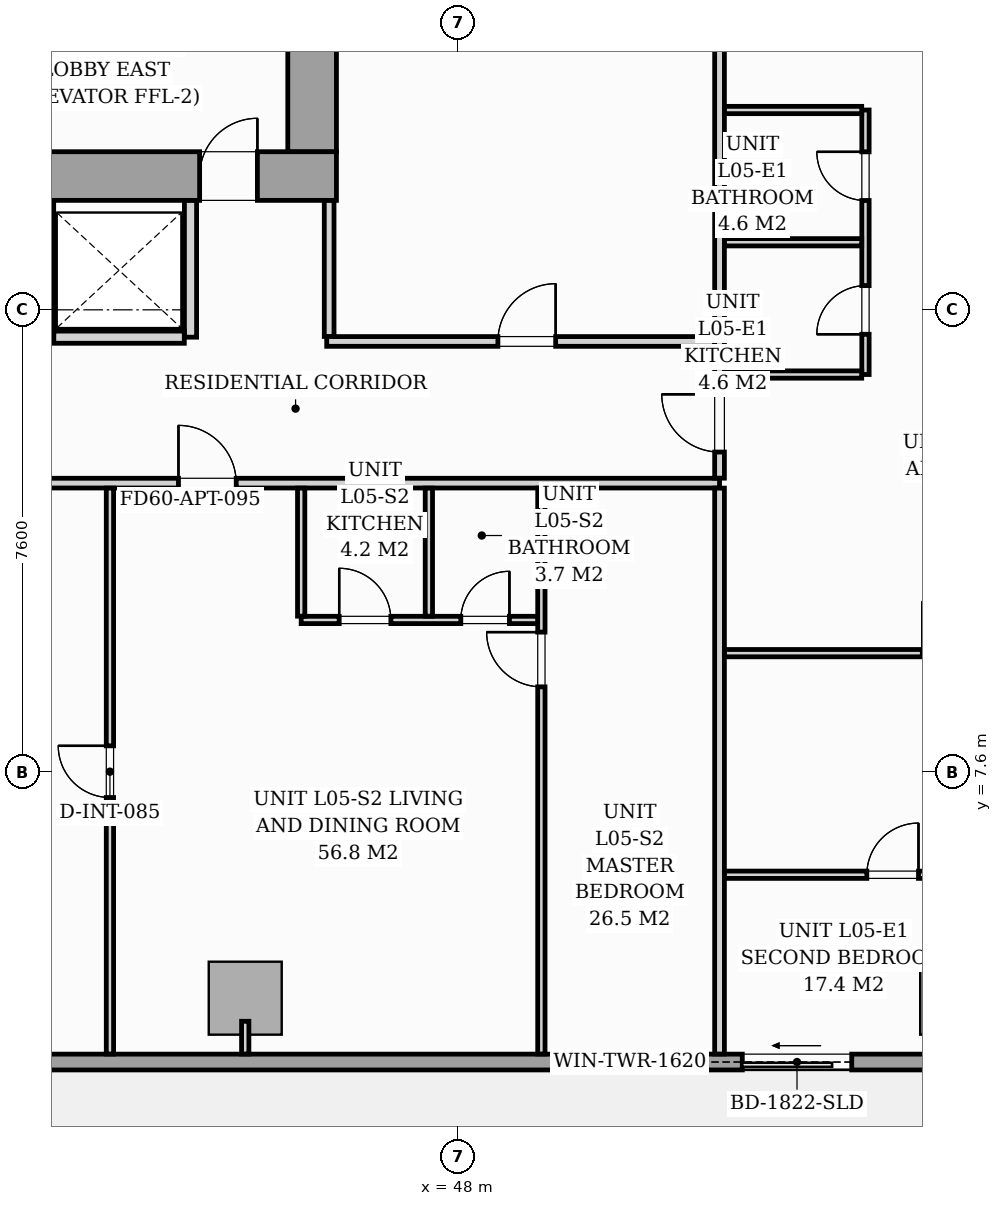
"""IFC4 building model, lengths in metres.
Left out: names, types, materials, properties, quantities, classifications, styles, units other than length and angle.
Written with IfcOpenShell. Run it as: python <this file> out.ifc"""

import sys

from ifc_helpers import new_model, si_unit, direction, frame, frame_2d, origin, origin_2d, place, context, subcontext, project, spatial, rectangle, i_section, extrude, source, transform, mapped, element, fill, save


model = new_model("IFC4")
c1 = context("Model", 3, precision=1e-05, world=origin(), true_north=direction((0.0, 1.0)))
c2 = subcontext(c1, "Body", "Model", "MODEL_VIEW")
j1 = project(units=[si_unit("LENGTHUNIT", "METRE"), si_unit("PLANEANGLEUNIT", "RADIAN")], contexts=[c1])
p1 = place(None, origin())
s1 = spatial("IfcSite", under=j1, at=p1, CompositionType="ELEMENT")
p2 = place(p1, origin())
s2 = spatial("IfcBuilding", under=s1, at=p2, CompositionType="ELEMENT")
p3 = place(p2, frame((0.0, 0.0, 23.0)))
s3 = spatial("IfcBuildingStorey", under=s2, at=p3, CompositionType="ELEMENT", Elevation=23.0)
m1 = source(origin(), c2, "Body", "SweptSolid", [
    extrude(i_section(OverallWidth=0.437, OverallDepth=0.514, WebThickness=0.061, FlangeThickness=0.097, FilletRadius=0.018, at=origin_2d()), origin(), (0.0, 0.0, 1.0), 3.196),
])
p4 = place(p3, frame((45.6, 17.4, 0.002), z_axis=(0.0, 0.0, 1.0), x_axis=(1.0, 0.0, 0.0)))
e1 = element("IfcColumn", 1, at=p4, inside=s3, PredefinedType="PILASTER", context=c2, shape_type="MappedRepresentation", body=[
    mapped(m1, transform((0.0, 0.0, 0.0), scale=1.0)),
])
m2 = source(origin(), c2, "Body", "SweptSolid", [
    extrude(rectangle(XDim=1.2, YDim=1.2, at=origin_2d()), origin(), (0.0, 0.0, 1.0), 3.194),
])
for number, where, z_axis, x_axis in (
    (2, (44.5, 3.88, 0.004), (0.0, 0.0, 1.0), (1.0, 0.0, 0.0)),
    (3, (56.2, 3.88, 0.004), (0.0, 0.0, 1.0), (1.0, 0.0, 0.0)),
):
    element("IfcColumn", number, at=place(p3, frame(where, z_axis=z_axis, x_axis=x_axis)), inside=s3, PredefinedType="COLUMN", context=c2, shape_type="MappedRepresentation", body=[
        mapped(m2, transform((0.0, 0.0, 0.0), scale=1.0)),
    ])
p5 = place(p3, frame((57.3, 2.83, 0.0), z_axis=(0.0, 0.0, 1.0), x_axis=(-1.0, 0.0, 0.0)))
e4 = element("IfcWall", 4, at=p5, inside=s3, PredefinedType="STANDARD", context=c2, shape_type="SweptSolid", body=[
    extrude(rectangle(XDim=17.15, YDim=0.26, at=frame_2d((8.575, 0.0))), origin(), (0.0, 0.0, 1.0), 2.94),
])
p6 = place(p5, frame((2.826, 0.0, 0.0)))
e5 = element("IfcOpeningElement", 5, at=p6, cuts=e4, PredefinedType="OPENING", context=c2, shape_type="SweptSolid", body=[
    extrude(rectangle(XDim=1.8, YDim=2.06, at=frame_2d((0.9, 1.03))), frame((0.0, 0.14, 0.0), z_axis=(0.0, -1.0, 0.0), x_axis=(1.0, 0.0, 0.0)), (0.0, 0.0, 1.0), 0.28),
])
p7 = place(p5, frame((5.675, 0.0, 0.75)))
e6 = element("IfcOpeningElement", 6, at=p7, cuts=e4, PredefinedType="OPENING", context=c2, shape_type="SweptSolid", body=[
    extrude(rectangle(XDim=1.6, YDim=1.5, at=frame_2d((0.8, 0.75))), frame((0.0, 0.14, 0.0), z_axis=(0.0, -1.0, 0.0), x_axis=(1.0, 0.0, 0.0)), (0.0, 0.0, 1.0), 0.28),
])
p8 = place(p3, frame((26.0, 17.4, 0.0), z_axis=(0.0, 0.0, 1.0), x_axis=(1.0, 0.0, 0.0)))
e7 = element("IfcWall", 7, at=p8, inside=s3, PredefinedType="SHEAR", context=c2, shape_type="SweptSolid", body=[
    extrude(rectangle(XDim=20.0, YDim=0.8, at=frame_2d((10.0, 0.0))), origin(), (0.0, 0.0, 1.0), 3.2),
])
p9 = place(p8, frame((1.15, 0.0, 0.0)))
e8 = element("IfcOpeningElement", 8, at=p9, cuts=e7, PredefinedType="OPENING", context=c2, shape_type="SweptSolid", body=[
    extrude(rectangle(XDim=0.95, YDim=2.06, at=frame_2d((0.475, 1.03))), frame((0.0, 0.41, 0.0), z_axis=(0.0, -1.0, 0.0), x_axis=(1.0, 0.0, 0.0)), (0.0, 0.0, 1.0), 0.82),
])
p10 = place(p8, frame((9.58, 0.0, 0.0)))
e9 = element("IfcOpeningElement", 9, at=p10, cuts=e7, PredefinedType="OPENING", context=c2, shape_type="SweptSolid", body=[
    extrude(rectangle(XDim=0.85, YDim=2.0, at=frame_2d((0.425, 1.0))), frame((0.0, 0.41, 0.0), z_axis=(0.0, -1.0, 0.0), x_axis=(1.0, 0.0, 0.0)), (0.0, 0.0, 1.0), 0.82),
])
p11 = place(p8, frame((17.75, 0.0, 0.0)))
e10 = element("IfcOpeningElement", 10, at=p11, cuts=e7, PredefinedType="OPENING", context=c2, shape_type="SweptSolid", body=[
    extrude(rectangle(XDim=0.95, YDim=2.06, at=frame_2d((0.475, 1.03))), frame((0.0, 0.41, 0.0), z_axis=(0.0, -1.0, 0.0), x_axis=(1.0, 0.0, 0.0)), (0.0, 0.0, 1.0), 0.82),
])
p12 = place(p3, frame((45.6, 17.802, 0.0), z_axis=(0.0, 0.0, 1.0), x_axis=(0.0, 1.0, 0.0)))
e11 = element("IfcWall", 11, at=p12, inside=s3, PredefinedType="SHEAR", context=c2, shape_type="SweptSolid", body=[
    extrude(rectangle(XDim=5.796, YDim=0.8, at=frame_2d((2.898, 0.0))), origin(), (0.0, 0.0, 1.0), 3.2),
])
for number, where, z_axis, x_axis in (
    (12, (41.25, 14.75, 0.0), (0.0, 0.0, 1.0), (0.0, 1.0, 0.0)),
    (13, (43.6, 14.75, 0.0), (0.0, 0.0, 1.0), (0.0, 1.0, 0.0)),
):
    element("IfcWall", number, at=place(p3, frame(where, z_axis=z_axis, x_axis=x_axis)), inside=s3, PredefinedType="PARTITIONING", context=c2, shape_type="SweptSolid", body=[
        extrude(rectangle(XDim=2.248, YDim=0.2, at=frame_2d((1.124, 0.0))), origin(), (0.0, 0.0, 1.0), 2.94),
    ])
p13 = place(p3, frame((41.352, 14.75, 0.0), z_axis=(0.0, 0.0, 1.0), x_axis=(1.0, 0.0, 0.0)))
e14 = element("IfcWall", 14, at=p13, inside=s3, PredefinedType="PARTITIONING", context=c2, shape_type="SweptSolid", body=[
    extrude(rectangle(XDim=2.146, YDim=0.2, at=frame_2d((1.073, 0.0))), origin(), (0.0, 0.0, 1.0), 2.94),
])
p14 = place(p3, frame((15.2, 12.35, 0.0), z_axis=(0.0, 0.0, 1.0), x_axis=(1.0, 0.0, 0.0)))
e15 = element("IfcWall", 15, at=p14, inside=s3, PredefinedType="PARTITIONING", context=c2, shape_type="SweptSolid", body=[
    extrude(rectangle(XDim=37.1, YDim=0.16, at=frame_2d((18.55, 0.0))), origin(), (0.0, 0.0, 1.0), 2.94),
])
p15 = place(p14, frame((2.964, 0.0, 0.0)))
e16 = element("IfcOpeningElement", 16, at=p15, cuts=e15, PredefinedType="OPENING", context=c2, shape_type="SweptSolid", body=[
    extrude(rectangle(XDim=0.95, YDim=2.06, at=frame_2d((0.475, 1.03))), frame((0.0, 0.09, 0.0), z_axis=(0.0, -1.0, 0.0), x_axis=(1.0, 0.0, 0.0)), (0.0, 0.0, 1.0), 0.18),
])
p16 = place(p14, frame((28.202, 0.0, 0.0)))
e17 = element("IfcOpeningElement", 17, at=p16, cuts=e15, PredefinedType="OPENING", context=c2, shape_type="SweptSolid", body=[
    extrude(rectangle(XDim=0.95, YDim=2.06, at=frame_2d((0.475, 1.03))), frame((0.0, 0.09, 0.0), z_axis=(0.0, -1.0, 0.0), x_axis=(1.0, 0.0, 0.0)), (0.0, 0.0, 1.0), 0.18),
])
p17 = place(p3, frame((52.3, 2.962, 0.0), z_axis=(0.0, 0.0, 1.0), x_axis=(0.0, 1.0, 0.0)))
e18 = element("IfcWall", 18, at=p17, inside=s3, PredefinedType="PARTITIONING", context=c2, shape_type="SweptSolid", body=[
    extrude(rectangle(XDim=9.306, YDim=0.16, at=frame_2d((4.653, 0.0))), origin(), (0.0, 0.0, 1.0), 2.94),
])
p18 = place(p3, frame((52.3, 12.432, 0.0), z_axis=(0.0, 0.0, 1.0), x_axis=(0.0, 1.0, 0.0)))
e19 = element("IfcWall", 19, at=p18, inside=s3, PredefinedType="PARTITIONING", context=c2, shape_type="SweptSolid", body=[
    extrude(rectangle(XDim=15.006, YDim=0.16, at=frame_2d((7.503, 0.0))), origin(), (0.0, 0.0, 1.0), 2.94),
])
p19 = place(p18, frame((0.429, 0.0, 0.0)))
e20 = element("IfcOpeningElement", 20, at=p19, cuts=e19, PredefinedType="OPENING", context=c2, shape_type="SweptSolid", body=[
    extrude(rectangle(XDim=0.95, YDim=2.06, at=frame_2d((0.475, 1.03))), frame((0.0, 0.09, 0.0), z_axis=(0.0, -1.0, 0.0), x_axis=(1.0, 0.0, 0.0)), (0.0, 0.0, 1.0), 0.18),
])
p20 = place(p3, frame((49.37, 2.962, 0.0), z_axis=(0.0, 0.0, 1.0), x_axis=(0.0, 1.0, 0.0)))
e21 = element("IfcWall", 21, at=p20, inside=s3, PredefinedType="PARTITIONING", context=c2, shape_type="SweptSolid", body=[
    extrude(rectangle(XDim=9.306, YDim=0.12, at=frame_2d((4.653, 0.0))), origin(), (0.0, 0.0, 1.0), 2.94),
])
p21 = place(p20, frame((6.038, 0.0, 0.0)))
e22 = element("IfcOpeningElement", 22, at=p21, cuts=e21, PredefinedType="OPENING", context=c2, shape_type="SweptSolid", body=[
    extrude(rectangle(XDim=0.9, YDim=2.05, at=frame_2d((0.45, 1.025))), frame((0.0, 0.07, 0.0), z_axis=(0.0, -1.0, 0.0), x_axis=(1.0, 0.0, 0.0)), (0.0, 0.0, 1.0), 0.14),
])
p22 = place(p3, frame((45.42, 10.1, 0.0), z_axis=(0.0, 0.0, 1.0), x_axis=(1.0, 0.0, 0.0)))
e23 = element("IfcWall", 23, at=p22, inside=s3, PredefinedType="PARTITIONING", context=c2, shape_type="SweptSolid", body=[
    extrude(rectangle(XDim=3.888, YDim=0.12, at=frame_2d((1.944, 0.0))), origin(), (0.0, 0.0, 1.0), 2.94),
])
p23 = place(p22, frame((0.625, 0.0, 0.0)))
e24 = element("IfcOpeningElement", 24, at=p23, cuts=e23, PredefinedType="OPENING", context=c2, shape_type="SweptSolid", body=[
    extrude(rectangle(XDim=0.85, YDim=2.05, at=frame_2d((0.425, 1.025))), frame((0.0, 0.07, 0.0), z_axis=(0.0, -1.0, 0.0), x_axis=(1.0, 0.0, 0.0)), (0.0, 0.0, 1.0), 0.14),
])
p24 = place(p22, frame((2.625, 0.0, 0.0)))
e25 = element("IfcOpeningElement", 25, at=p24, cuts=e23, PredefinedType="OPENING", context=c2, shape_type="SweptSolid", body=[
    extrude(rectangle(XDim=0.8, YDim=2.02, at=frame_2d((0.4, 1.01))), frame((0.0, 0.07, 0.0), z_axis=(0.0, -1.0, 0.0), x_axis=(1.0, 0.0, 0.0)), (0.0, 0.0, 1.0), 0.14),
])
for number, where, z_axis, x_axis in (
    (26, (47.52, 10.162, 0.0), (0.0, 0.0, 1.0), (0.0, 1.0, 0.0)),
    (27, (45.42, 10.162, 0.0), (0.0, 0.0, 1.0), (0.0, 1.0, 0.0)),
):
    element("IfcWall", number, at=place(p3, frame(where, z_axis=z_axis, x_axis=x_axis)), inside=s3, PredefinedType="PARTITIONING", context=c2, shape_type="SweptSolid", body=[
        extrude(rectangle(XDim=2.106, YDim=0.12, at=frame_2d((1.053, 0.0))), origin(), (0.0, 0.0, 1.0), 2.94),
    ])
p25 = place(p3, frame((42.275, 2.962, 0.0), z_axis=(0.0, 0.0, 1.0), x_axis=(0.0, 1.0, 0.0)))
e28 = element("IfcWall", 28, at=p25, inside=s3, PredefinedType="PARTITIONING", context=c2, shape_type="SweptSolid", body=[
    extrude(rectangle(XDim=9.306, YDim=0.12, at=frame_2d((4.653, 0.0))), origin(), (0.0, 0.0, 1.0), 2.94),
])
p26 = place(p25, frame((4.218, 0.0, 0.0)))
e29 = element("IfcOpeningElement", 29, at=p26, cuts=e28, PredefinedType="OPENING", context=c2, shape_type="SweptSolid", body=[
    extrude(rectangle(XDim=0.85, YDim=2.05, at=frame_2d((0.425, 1.025))), frame((0.0, 0.07, 0.0), z_axis=(0.0, -1.0, 0.0), x_axis=(1.0, 0.0, 0.0)), (0.0, 0.0, 1.0), 0.14),
])
p27 = place(p3, frame((54.7, 14.136, 0.0), z_axis=(0.0, 0.0, 1.0), x_axis=(0.0, 1.0, 0.0)))
e30 = element("IfcWall", 30, at=p27, inside=s3, PredefinedType="PARTITIONING", context=c2, shape_type="SweptSolid", body=[
    extrude(rectangle(XDim=4.35, YDim=0.12, at=frame_2d((2.175, 0.0))), origin(), (0.0, 0.0, 1.0), 2.94),
])
p28 = place(p27, frame((0.662, 0.0, 0.0)))
e31 = element("IfcOpeningElement", 31, at=p28, cuts=e30, PredefinedType="OPENING", context=c2, shape_type="SweptSolid", body=[
    extrude(rectangle(XDim=0.8, YDim=2.0, at=frame_2d((0.4, 1.0))), frame((0.0, 0.07, 0.0), z_axis=(0.0, -1.0, 0.0), x_axis=(1.0, 0.0, 0.0)), (0.0, 0.0, 1.0), 0.14),
])
p29 = place(p27, frame((2.862, 0.0, 0.0)))
e32 = element("IfcOpeningElement", 32, at=p29, cuts=e30, PredefinedType="OPENING", context=c2, shape_type="SweptSolid", body=[
    extrude(rectangle(XDim=0.8, YDim=2.02, at=frame_2d((0.4, 1.01))), frame((0.0, 0.07, 0.0), z_axis=(0.0, -1.0, 0.0), x_axis=(1.0, 0.0, 0.0)), (0.0, 0.0, 1.0), 0.14),
])
p30 = place(p3, frame((52.382, 16.311, 0.0), z_axis=(0.0, 0.0, 1.0), x_axis=(1.0, 0.0, 0.0)))
e33 = element("IfcWall", 33, at=p30, inside=s3, PredefinedType="PARTITIONING", context=c2, shape_type="SweptSolid", body=[
    extrude(rectangle(XDim=2.256, YDim=0.12, at=frame_2d((1.128, 0.0))), origin(), (0.0, 0.0, 1.0), 2.045),
])
for number, where, z_axis, x_axis in (
    (34, (52.382, 14.136, 0.0), (0.0, 0.0, 1.0), (1.0, 0.0, 0.0)),
    (35, (52.382, 18.486, 0.0), (0.0, 0.0, 1.0), (1.0, 0.0, 0.0)),
):
    element("IfcWall", number, at=place(p3, frame(where, z_axis=z_axis, x_axis=x_axis)), inside=s3, PredefinedType="PARTITIONING", context=c2, shape_type="SweptSolid", body=[
        extrude(rectangle(XDim=2.256, YDim=0.12, at=frame_2d((1.128, 0.0))), origin(), (0.0, 0.0, 1.0), 2.94),
    ])
p31 = place(p3, frame((52.382, 5.91, 0.0), z_axis=(0.0, 0.0, 1.0), x_axis=(1.0, 0.0, 0.0)))
e36 = element("IfcWall", 36, at=p31, inside=s3, PredefinedType="PARTITIONING", context=c2, shape_type="SweptSolid", body=[
    extrude(rectangle(XDim=7.338, YDim=0.12, at=frame_2d((3.669, 0.0))), origin(), (0.0, 0.0, 1.0), 2.94),
])
p32 = place(p31, frame((2.34, 0.0, 0.0)))
e37 = element("IfcOpeningElement", 37, at=p32, cuts=e36, PredefinedType="OPENING", context=c2, shape_type="SweptSolid", body=[
    extrude(rectangle(XDim=0.85, YDim=2.05, at=frame_2d((0.425, 1.025))), frame((0.0, 0.07, 0.0), z_axis=(0.0, -1.0, 0.0), x_axis=(1.0, 0.0, 0.0)), (0.0, 0.0, 1.0), 0.14),
])
p33 = place(p3, frame((52.382, 9.554, 0.0), z_axis=(0.0, 0.0, 1.0), x_axis=(1.0, 0.0, 0.0)))
e38 = element("IfcWall", 38, at=p33, inside=s3, PredefinedType="PARTITIONING", context=c2, shape_type="SweptSolid", body=[
    extrude(rectangle(XDim=7.338, YDim=0.12, at=frame_2d((3.669, 0.0))), origin(), (0.0, 0.0, 1.0), 2.94),
])
p34 = place(p33, frame((3.253, 0.0, 0.0)))
e39 = element("IfcOpeningElement", 39, at=p34, cuts=e38, PredefinedType="OPENING", context=c2, shape_type="SweptSolid", body=[
    extrude(rectangle(XDim=0.85, YDim=2.05, at=frame_2d((0.425, 1.025))), frame((0.0, 0.07, 0.0), z_axis=(0.0, -1.0, 0.0), x_axis=(1.0, 0.0, 0.0)), (0.0, 0.0, 1.0), 0.14),
])
p35 = place(p3, frame((45.84, 14.68, 0.0), z_axis=(0.0, 0.0, 1.0), x_axis=(1.0, 0.0, 0.0)))
e40 = element("IfcWall", 40, at=p35, inside=s3, PredefinedType="PARTITIONING", context=c2, shape_type="SweptSolid", body=[
    extrude(rectangle(XDim=6.378, YDim=0.16, at=frame_2d((3.189, 0.0))), origin(), (0.0, 0.0, 1.0), 2.94),
])
p36 = place(p35, frame((2.815, 0.0, 0.0)))
e41 = element("IfcOpeningElement", 41, at=p36, cuts=e40, PredefinedType="OPENING", context=c2, shape_type="SweptSolid", body=[
    extrude(rectangle(XDim=0.95, YDim=2.06, at=frame_2d((0.475, 1.03))), frame((0.0, 0.09, 0.0), z_axis=(0.0, -1.0, 0.0), x_axis=(1.0, 0.0, 0.0)), (0.0, 0.0, 1.0), 0.18),
])
p37 = place(p3, frame((45.88, 14.762, 0.0), z_axis=(0.0, 0.0, 1.0), x_axis=(0.0, 1.0, 0.0)))
e42 = element("IfcWall", 42, at=p37, inside=s3, PredefinedType="PARTITIONING", context=c2, shape_type="SweptSolid", body=[
    extrude(rectangle(XDim=2.236, YDim=0.16, at=frame_2d((1.118, 0.0))), origin(), (0.0, 0.0, 1.0), 2.94),
])
p38 = place(p3, frame((44.5, 3.5, 0.0), z_axis=(0.0, 0.0, 1.0), x_axis=(0.0, -1.0, 0.0)))
e43 = element("IfcWall", 43, at=p38, inside=s3, PredefinedType="PARTITIONING", context=c2, shape_type="SweptSolid", body=[
    extrude(rectangle(XDim=0.538, YDim=0.12, at=frame_2d((0.269, 0.0))), origin(), (0.0, 0.0, 1.0), 2.94),
])
m3 = source(origin(), c2, "Body", "SweptSolid", [
    extrude(rectangle(XDim=1.8, YDim=2.06, at=frame_2d((0.9, 1.03))), frame((0.0, 0.025, 0.0), z_axis=(0.0, -1.0, 0.0), x_axis=(1.0, 0.0, 0.0)), (0.0, 0.0, 1.0), 0.05),
])
p39 = place(p6, origin())
e44 = element("IfcDoor", 44, at=p39, inside=s3, OperationType="SLIDING_TO_RIGHT", PredefinedType="DOOR", context=c2, shape_type="MappedRepresentation", body=[
    mapped(m3, transform((0.0, 0.0, 0.0), scale=1.0)),
])
fill(e5, e44)
m4 = source(origin(), c2, "Body", "SweptSolid", [
    extrude(rectangle(XDim=1.6, YDim=1.5, at=frame_2d((0.8, 0.75))), frame((0.0, 0.03, 0.0), z_axis=(0.0, -1.0, 0.0), x_axis=(1.0, 0.0, 0.0)), (0.0, 0.0, 1.0), 0.06),
])
p40 = place(p7, origin())
e45 = element("IfcWindow", 45, at=p40, inside=s3, PartitioningType="SINGLE_PANEL", PredefinedType="WINDOW", context=c2, shape_type="MappedRepresentation", body=[
    mapped(m4, transform((0.0, 0.0, 0.0), scale=1.0)),
])
fill(e6, e45)
m5 = source(origin(), c2, "Body", "SweptSolid", [
    extrude(rectangle(XDim=0.95, YDim=2.06, at=frame_2d((0.475, 1.03))), frame((0.0, 0.025, 0.0), z_axis=(0.0, -1.0, 0.0), x_axis=(1.0, 0.0, 0.0)), (0.0, 0.0, 1.0), 0.05),
])
p41 = place(p11, origin())
e46 = element("IfcDoor", 46, at=p41, inside=s3, OperationType="SINGLE_SWING_RIGHT", PredefinedType="DOOR", context=c2, shape_type="MappedRepresentation", body=[
    mapped(m5, transform((0.0, 0.0, 0.0), scale=1.0)),
])
fill(e10, e46)
m6 = source(origin(), c2, "Body", "SweptSolid", [
    extrude(rectangle(XDim=0.85, YDim=2.05, at=frame_2d((0.425, 1.025))), frame((0.0, 0.025, 0.0), z_axis=(0.0, -1.0, 0.0), x_axis=(1.0, 0.0, 0.0)), (0.0, 0.0, 1.0), 0.05),
])
p42 = place(p26, origin())
e47 = element("IfcDoor", 47, at=p42, inside=s3, OperationType="SINGLE_SWING_RIGHT", PredefinedType="DOOR", context=c2, shape_type="MappedRepresentation", body=[
    mapped(m6, transform((0.0, 0.0, 0.0), scale=1.0)),
])
fill(e29, e47)
m7 = source(origin(), c2, "Body", "SweptSolid", [
    extrude(rectangle(XDim=0.95, YDim=2.06, at=frame_2d((0.475, 1.03))), frame((0.0, 0.025, 0.0), z_axis=(0.0, -1.0, 0.0), x_axis=(1.0, 0.0, 0.0)), (0.0, 0.0, 1.0), 0.05),
])
p43 = place(p16, origin())
e48 = element("IfcDoor", 48, at=p43, inside=s3, OperationType="SINGLE_SWING_LEFT", PredefinedType="DOOR", context=c2, shape_type="MappedRepresentation", body=[
    mapped(m7, transform((0.0, 0.0, 0.0), scale=1.0)),
])
fill(e17, e48)
m8 = source(origin(), c2, "Body", "SweptSolid", [
    extrude(rectangle(XDim=0.9, YDim=2.05, at=frame_2d((0.45, 1.025))), frame((0.0, 0.025, 0.0), z_axis=(0.0, -1.0, 0.0), x_axis=(1.0, 0.0, 0.0)), (0.0, 0.0, 1.0), 0.05),
])
p44 = place(p21, origin())
e49 = element("IfcDoor", 49, at=p44, inside=s3, OperationType="SINGLE_SWING_RIGHT", PredefinedType="DOOR", context=c2, shape_type="MappedRepresentation", body=[
    mapped(m8, transform((0.0, 0.0, 0.0), scale=1.0)),
])
fill(e22, e49)
p45 = place(p23, origin())
e50 = element("IfcDoor", 50, at=p45, inside=s3, OperationType="SINGLE_SWING_LEFT", PredefinedType="DOOR", context=c2, shape_type="MappedRepresentation", body=[
    mapped(m6, transform((0.0, 0.0, 0.0), scale=1.0)),
])
fill(e24, e50)
m9 = source(origin(), c2, "Body", "SweptSolid", [
    extrude(rectangle(XDim=0.8, YDim=2.02, at=frame_2d((0.4, 1.01))), frame((0.0, 0.025, 0.0), z_axis=(0.0, -1.0, 0.0), x_axis=(1.0, 0.0, 0.0)), (0.0, 0.0, 1.0), 0.05),
])
p46 = place(p24, origin())
e51 = element("IfcDoor", 51, at=p46, inside=s3, OperationType="SINGLE_SWING_RIGHT", PredefinedType="DOOR", context=c2, shape_type="MappedRepresentation", body=[
    mapped(m9, transform((0.0, 0.0, 0.0), scale=1.0)),
])
fill(e25, e51)
p47 = place(p19, origin())
e52 = element("IfcDoor", 52, at=p47, inside=s3, OperationType="SINGLE_SWING_RIGHT", PredefinedType="DOOR", context=c2, shape_type="MappedRepresentation", body=[
    mapped(m7, transform((0.0, 0.0, 0.0), scale=1.0)),
])
fill(e20, e52)
m10 = source(origin(), c2, "Body", "SweptSolid", [
    extrude(rectangle(XDim=0.8, YDim=2.0, at=frame_2d((0.4, 1.0))), frame((0.0, 0.025, 0.0), z_axis=(0.0, -1.0, 0.0), x_axis=(1.0, 0.0, 0.0)), (0.0, 0.0, 1.0), 0.05),
])
p48 = place(p28, origin())
e53 = element("IfcDoor", 53, at=p48, inside=s3, OperationType="SINGLE_SWING_LEFT", PredefinedType="DOOR", context=c2, shape_type="MappedRepresentation", body=[
    mapped(m10, transform((0.0, 0.0, 0.0), scale=1.0)),
])
fill(e31, e53)
p49 = place(p29, origin())
e54 = element("IfcDoor", 54, at=p49, inside=s3, OperationType="SINGLE_SWING_RIGHT", PredefinedType="DOOR", context=c2, shape_type="MappedRepresentation", body=[
    mapped(m9, transform((0.0, 0.0, 0.0), scale=1.0)),
])
fill(e32, e54)
p50 = place(p32, origin())
e55 = element("IfcDoor", 55, at=p50, inside=s3, OperationType="SINGLE_SWING_RIGHT", PredefinedType="DOOR", context=c2, shape_type="MappedRepresentation", body=[
    mapped(m6, transform((0.0, 0.0, 0.0), scale=1.0)),
])
fill(e37, e55)
p51 = place(p34, origin())
e56 = element("IfcDoor", 56, at=p51, inside=s3, OperationType="SINGLE_SWING_LEFT", PredefinedType="DOOR", context=c2, shape_type="MappedRepresentation", body=[
    mapped(m6, transform((0.0, 0.0, 0.0), scale=1.0)),
])
fill(e39, e56)
p52 = place(p36, origin())
e57 = element("IfcDoor", 57, at=p52, inside=s3, OperationType="SINGLE_SWING_RIGHT", PredefinedType="DOOR", context=c2, shape_type="MappedRepresentation", body=[
    mapped(m7, transform((0.0, 0.0, 0.0), scale=1.0)),
])
fill(e41, e57)
save(model, sys.argv[1])
